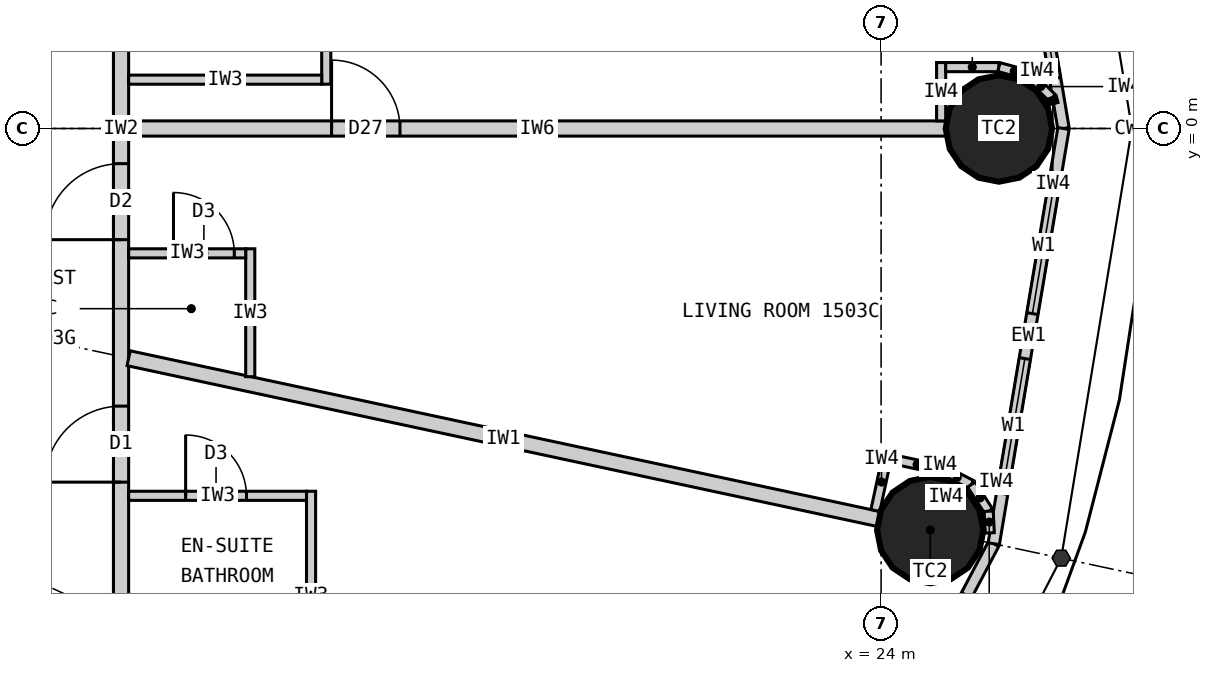
"""IFC4 building model, lengths in metres.
Left out: names, types, materials, properties, quantities, classifications, styles, units other than length and angle.
Written with IfcOpenShell. Run it as: python <this file> out.ifc"""

import sys

from ifc_helpers import new_model, si_unit, direction, frame, frame_2d, origin, origin_2d, place, context, subcontext, project, spatial, rectangle, circle, extrude, element, fill, save


model = new_model("IFC4")
c1 = context("Model", 3, precision=1e-05, world=origin(), true_north=direction((0.0, 1.0)))
c2 = subcontext(c1, "Body", "Model", "MODEL_VIEW")
j1 = project(units=[si_unit("LENGTHUNIT", "METRE"), si_unit("PLANEANGLEUNIT", "RADIAN")], contexts=[c1])
p1 = place(None, origin())
s1 = spatial("IfcSite", under=j1, at=p1, CompositionType="ELEMENT")
p2 = place(p1, origin())
s2 = spatial("IfcBuilding", under=s1, at=p2, CompositionType="ELEMENT")
p3 = place(p2, frame((0.0, 0.0, 63.9)))
s3 = spatial("IfcBuildingStorey", under=s2, at=p3, CompositionType="ELEMENT", Elevation=63.9)
for number, where, z_axis, x_axis in (
    (1, (25.55, 0.0, 0.0), (0.0, 0.0, 1.0), (1.0, 0.0, 0.0)),
    (2, (24.647, -5.283, 0.0), (0.0, 0.0, 1.0), (1.0, 0.0, 0.0)),
):
    element("IfcColumn", number, at=place(p3, frame(where, z_axis=z_axis, x_axis=x_axis)), inside=s3, PredefinedType="COLUMN", context=c2, shape_type="SweptSolid", body=[
        extrude(circle(Radius=0.7, at=origin_2d()), origin(), (0.0, 0.0, 1.0), 3.3),
    ])
p4 = place(p3, frame((26.4, 0.0, 0.0), z_axis=(0.0, 0.0, 1.0), x_axis=(-0.165642551694, 0.986185857264, 0.0)))
e3 = element("IfcWall", 3, at=p4, inside=s3, PredefinedType="ELEMENTEDWALL", context=c2, shape_type="SweptSolid", body=[
    extrude(rectangle(XDim=5.539, YDim=0.15, at=frame_2d((2.77, 0.0))), origin(), (0.0, 0.0, 1.0), 3.12),
])
p5 = place(p4, frame((0.669, 0.0, 0.9)))
e4 = element("IfcOpeningElement", 4, at=p5, cuts=e3, PredefinedType="OPENING", context=c2, shape_type="SweptSolid", body=[
    extrude(rectangle(XDim=1.8, YDim=1.9, at=frame_2d((0.9, 0.95))), frame((0.0, 0.085, 0.0), z_axis=(0.0, -1.0, 0.0), x_axis=(1.0, 0.0, 0.0)), (0.0, 0.0, 1.0), 0.17),
])
p6 = place(p4, frame((3.07, 0.0, 0.9)))
e5 = element("IfcOpeningElement", 5, at=p6, cuts=e3, PredefinedType="OPENING", context=c2, shape_type="SweptSolid", body=[
    extrude(rectangle(XDim=1.8, YDim=1.9, at=frame_2d((0.9, 0.95))), frame((0.0, 0.085, 0.0), z_axis=(0.0, -1.0, 0.0), x_axis=(1.0, 0.0, 0.0)), (0.0, 0.0, 1.0), 0.17),
])
p7 = place(p3, frame((22.803, -10.532, 0.0), z_axis=(0.0, 0.0, 1.0), x_axis=(0.467296867008, 0.884100468321, 0.0)))
e6 = element("IfcWall", 6, at=p7, inside=s3, PredefinedType="ELEMENTEDWALL", context=c2, shape_type="SweptSolid", body=[
    extrude(rectangle(XDim=5.734, YDim=0.15, at=frame_2d((2.867, 0.0))), origin(), (0.0, 0.0, 1.0), 3.12),
])
p8 = place(p7, frame((0.767, 0.0, 0.9)))
e7 = element("IfcOpeningElement", 7, at=p8, cuts=e6, PredefinedType="OPENING", context=c2, shape_type="SweptSolid", body=[
    extrude(rectangle(XDim=1.8, YDim=1.9, at=frame_2d((0.9, 0.95))), frame((0.0, 0.085, 0.0), z_axis=(0.0, -1.0, 0.0), x_axis=(1.0, 0.0, 0.0)), (0.0, 0.0, 1.0), 0.17),
])
p9 = place(p7, frame((3.167, 0.0, 0.9)))
e8 = element("IfcOpeningElement", 8, at=p9, cuts=e6, PredefinedType="OPENING", context=c2, shape_type="SweptSolid", body=[
    extrude(rectangle(XDim=1.8, YDim=1.9, at=frame_2d((0.9, 0.95))), frame((0.0, 0.085, 0.0), z_axis=(0.0, -1.0, 0.0), x_axis=(1.0, 0.0, 0.0)), (0.0, 0.0, 1.0), 0.17),
])
p10 = place(p3, frame((25.482, -5.462, 0.0), z_axis=(0.0, 0.0, 1.0), x_axis=(0.165642551694, 0.986185857264, 0.0)))
e9 = element("IfcWall", 9, at=p10, inside=s3, PredefinedType="ELEMENTEDWALL", context=c2, shape_type="SweptSolid", body=[
    extrude(rectangle(XDim=5.539, YDim=0.15, at=frame_2d((2.77, 0.0))), origin(), (0.0, 0.0, 1.0), 3.12),
])
p11 = place(p10, frame((0.669, 0.0, 0.9)))
e10 = element("IfcOpeningElement", 10, at=p11, cuts=e9, PredefinedType="OPENING", context=c2, shape_type="SweptSolid", body=[
    extrude(rectangle(XDim=1.8, YDim=1.9, at=frame_2d((0.9, 0.95))), frame((0.0, 0.085, 0.0), z_axis=(0.0, -1.0, 0.0), x_axis=(1.0, 0.0, 0.0)), (0.0, 0.0, 1.0), 0.17),
])
p12 = place(p10, frame((3.07, 0.0, 0.9)))
e11 = element("IfcOpeningElement", 11, at=p12, cuts=e9, PredefinedType="OPENING", context=c2, shape_type="SweptSolid", body=[
    extrude(rectangle(XDim=1.8, YDim=1.9, at=frame_2d((0.9, 0.95))), frame((0.0, 0.085, 0.0), z_axis=(0.0, -1.0, 0.0), x_axis=(1.0, 0.0, 0.0)), (0.0, 0.0, 1.0), 0.17),
])
p13 = place(p3, frame((14.0, -9.9, 0.0), z_axis=(0.0, 0.0, 1.0), x_axis=(0.0, 1.0, 0.0)))
e12 = element("IfcWall", 12, at=p13, inside=s3, PredefinedType="PARTITIONING", context=c2, shape_type="SweptSolid", body=[
    extrude(rectangle(XDim=19.8, YDim=0.2, at=frame_2d((9.9, 0.0))), origin(), (0.0, 0.0, 1.0), 3.12),
])
p14 = place(p13, frame((0.103, 0.0, 0.0)))
e13 = element("IfcOpeningElement", 13, at=p14, cuts=e12, PredefinedType="OPENING", context=c2, shape_type="SweptSolid", body=[
    extrude(rectangle(XDim=1.0, YDim=2.2, at=frame_2d((0.5, 1.1))), frame((0.0, 0.11, 0.0), z_axis=(0.0, -1.0, 0.0), x_axis=(1.0, 0.0, 0.0)), (0.0, 0.0, 1.0), 0.22),
])
p15 = place(p13, frame((5.248, 0.0, 0.0)))
e14 = element("IfcOpeningElement", 14, at=p15, cuts=e12, PredefinedType="OPENING", context=c2, shape_type="SweptSolid", body=[
    extrude(rectangle(XDim=1.0, YDim=2.2, at=frame_2d((0.5, 1.1))), frame((0.0, 0.11, 0.0), z_axis=(0.0, -1.0, 0.0), x_axis=(1.0, 0.0, 0.0)), (0.0, 0.0, 1.0), 0.22),
])
p16 = place(p13, frame((8.438, 0.0, 0.0)))
e15 = element("IfcOpeningElement", 15, at=p16, cuts=e12, PredefinedType="OPENING", context=c2, shape_type="SweptSolid", body=[
    extrude(rectangle(XDim=1.0, YDim=2.2, at=frame_2d((0.5, 1.1))), frame((0.0, 0.11, 0.0), z_axis=(0.0, -1.0, 0.0), x_axis=(1.0, 0.0, 0.0)), (0.0, 0.0, 1.0), 0.22),
])
p17 = place(p13, frame((14.532, 0.0, 0.0)))
e16 = element("IfcOpeningElement", 16, at=p17, cuts=e12, PredefinedType="OPENING", context=c2, shape_type="SweptSolid", body=[
    extrude(rectangle(XDim=1.0, YDim=2.2, at=frame_2d((0.5, 1.1))), frame((0.0, 0.11, 0.0), z_axis=(0.0, -1.0, 0.0), x_axis=(1.0, 0.0, 0.0)), (0.0, 0.0, 1.0), 0.22),
])
p18 = place(p3, frame((14.1, 0.0, 0.0), z_axis=(0.0, 0.0, 1.0), x_axis=(1.0, 0.0, 0.0)))
e17 = element("IfcWall", 17, at=p18, inside=s3, PredefinedType="PARTITIONING", context=c2, shape_type="SweptSolid", body=[
    extrude(rectangle(XDim=10.75, YDim=0.2, at=frame_2d((5.375, 0.0))), origin(), (0.0, 0.0, 1.0), 2.27),
])
p19 = place(p18, frame((2.67, 0.0, 0.0)))
e18 = element("IfcOpeningElement", 18, at=p19, cuts=e17, PredefinedType="OPENING", context=c2, shape_type="SweptSolid", body=[
    extrude(rectangle(XDim=0.9, YDim=2.1, at=frame_2d((0.45, 1.05))), frame((0.0, 0.11, 0.0), z_axis=(0.0, -1.0, 0.0), x_axis=(1.0, 0.0, 0.0)), (0.0, 0.0, 1.0), 0.22),
])
p20 = place(p3, frame((14.1, -3.022, 0.0), z_axis=(0.0, 0.0, 1.0), x_axis=(0.977790014929, -0.209586943072, 0.0)))
e19 = element("IfcWall", 19, at=p20, inside=s3, PredefinedType="PARTITIONING", context=c2, shape_type="SweptSolid", body=[
    extrude(rectangle(XDim=10.087, YDim=0.2, at=frame_2d((5.043, 0.0))), origin(), (0.0, 0.0, 1.0), 2.32),
])
p21 = place(p3, frame((16.5, -7.521, 0.0), z_axis=(0.0, 0.0, 1.0), x_axis=(0.0, 1.0, 0.0)))
e20 = element("IfcWall", 20, at=p21, inside=s3, PredefinedType="PARTITIONING", context=c2, shape_type="SweptSolid", body=[
    extrude(rectangle(XDim=2.749, YDim=0.12, at=frame_2d((1.374, 0.0))), origin(), (0.0, 0.0, 1.0), 3.12),
])
p22 = place(p3, frame((14.1, -4.833, 0.0), z_axis=(0.0, 0.0, 1.0), x_axis=(1.0, 0.0, 0.0)))
e21 = element("IfcWall", 21, at=p22, inside=s3, PredefinedType="PARTITIONING", context=c2, shape_type="SweptSolid", body=[
    extrude(rectangle(XDim=2.34, YDim=0.12, at=frame_2d((1.17, 0.0))), origin(), (0.0, 0.0, 1.0), 3.12),
])
p23 = place(p22, frame((0.75, 0.0, 0.0)))
e22 = element("IfcOpeningElement", 22, at=p23, cuts=e21, PredefinedType="OPENING", context=c2, shape_type="SweptSolid", body=[
    extrude(rectangle(XDim=0.8, YDim=2.1, at=frame_2d((0.4, 1.05))), frame((0.0, 0.07, 0.0), z_axis=(0.0, -1.0, 0.0), x_axis=(1.0, 0.0, 0.0)), (0.0, 0.0, 1.0), 0.14),
])
p24 = place(p3, frame((15.7, -3.265, 0.0), z_axis=(0.0, 0.0, 1.0), x_axis=(0.0, 1.0, 0.0)))
e23 = element("IfcWall", 23, at=p24, inside=s3, PredefinedType="PARTITIONING", context=c2, shape_type="SweptSolid", body=[
    extrude(rectangle(XDim=1.683, YDim=0.12, at=frame_2d((0.841, 0.0))), origin(), (0.0, 0.0, 1.0), 3.12),
])
p25 = place(p3, frame((14.1, -1.643, 0.0), z_axis=(0.0, 0.0, 1.0), x_axis=(1.0, 0.0, 0.0)))
e24 = element("IfcWall", 24, at=p25, inside=s3, PredefinedType="PARTITIONING", context=c2, shape_type="SweptSolid", body=[
    extrude(rectangle(XDim=1.54, YDim=0.12, at=frame_2d((0.77, 0.0))), origin(), (0.0, 0.0, 1.0), 2.32),
])
p26 = place(p25, frame((0.59, 0.0, 0.0)))
e25 = element("IfcOpeningElement", 25, at=p26, cuts=e24, PredefinedType="OPENING", context=c2, shape_type="SweptSolid", body=[
    extrude(rectangle(XDim=0.8, YDim=2.1, at=frame_2d((0.4, 1.05))), frame((0.0, 0.07, 0.0), z_axis=(0.0, -1.0, 0.0), x_axis=(1.0, 0.0, 0.0)), (0.0, 0.0, 1.0), 0.14),
])
p27 = place(p3, frame((16.7, 3.48, 0.0), z_axis=(0.0, 0.0, 1.0), x_axis=(0.0, -1.0, 0.0)))
e26 = element("IfcWall", 26, at=p27, inside=s3, PredefinedType="PARTITIONING", context=c2, shape_type="SweptSolid", body=[
    extrude(rectangle(XDim=2.897, YDim=0.12, at=frame_2d((1.449, 0.0))), origin(), (0.0, 0.0, 1.0), 3.12),
])
p28 = place(p27, frame((1.049, 0.0, 0.0)))
e27 = element("IfcOpeningElement", 27, at=p28, cuts=e26, PredefinedType="OPENING", context=c2, shape_type="SweptSolid", body=[
    extrude(rectangle(XDim=0.8, YDim=2.1, at=frame_2d((0.4, 1.05))), frame((0.0, 0.07, 0.0), z_axis=(0.0, -1.0, 0.0), x_axis=(1.0, 0.0, 0.0)), (0.0, 0.0, 1.0), 0.14),
])
p29 = place(p3, frame((14.1, 0.643, 0.0), z_axis=(0.0, 0.0, 1.0), x_axis=(1.0, 0.0, 0.0)))
e28 = element("IfcWall", 28, at=p29, inside=s3, PredefinedType="PARTITIONING", context=c2, shape_type="SweptSolid", body=[
    extrude(rectangle(XDim=2.54, YDim=0.12, at=frame_2d((1.27, 0.0))), origin(), (0.0, 0.0, 1.0), 3.12),
])
p30 = place(p3, frame((24.79, 0.1, 0.0), z_axis=(0.0, 0.0, 1.0), x_axis=(0.0, 1.0, 0.0)))
e29 = element("IfcWall", 29, at=p30, inside=s3, PredefinedType="PARTITIONING", context=c2, shape_type="SweptSolid", body=[
    extrude(rectangle(XDim=0.767, YDim=0.12, at=frame_2d((0.384, 0.0))), origin(), (0.0, 0.0, 1.0), 3.12),
])
p31 = place(p3, frame((24.85, 0.808, 0.0), z_axis=(0.0, 0.0, 1.0), x_axis=(1.0, 0.0, 0.0)))
e30 = element("IfcWall", 30, at=p31, inside=s3, PredefinedType="PARTITIONING", context=c2, shape_type="SweptSolid", body=[
    extrude(rectangle(XDim=0.7, YDim=0.12, at=frame_2d((0.35, 0.0))), origin(), (0.0, 0.0, 1.0), 3.12),
])
p32 = place(p3, frame((25.55, 0.808, 0.0), z_axis=(0.0, 0.0, 1.0), x_axis=(0.965807183573, -0.2592614205, 0.0)))
e31 = element("IfcWall", 31, at=p32, inside=s3, PredefinedType="PARTITIONING", context=c2, shape_type="SweptSolid", body=[
    extrude(rectangle(XDim=0.418, YDim=0.12, at=frame_2d((0.209, 0.0))), origin(), (0.0, 0.0, 1.0), 3.12),
])
p33 = place(p3, frame((25.954, 0.699, 0.0), z_axis=(0.0, 0.0, 1.0), x_axis=(0.707106781187, -0.707106781187, 0.0)))
e32 = element("IfcWall", 32, at=p33, inside=s3, PredefinedType="PARTITIONING", context=c2, shape_type="SweptSolid", body=[
    extrude(rectangle(XDim=0.418, YDim=0.12, at=frame_2d((0.209, 0.0))), origin(), (0.0, 0.0, 1.0), 3.12),
])
p34 = place(p3, frame((26.249, 0.404, 0.0), z_axis=(0.0, 0.0, 1.0), x_axis=(0.259754282609, -0.965674744759, 0.0)))
e33 = element("IfcWall", 33, at=p34, inside=s3, PredefinedType="PARTITIONING", context=c2, shape_type="SweptSolid", body=[
    extrude(rectangle(XDim=0.08, YDim=0.12, at=frame_2d((0.04, 0.0))), origin(), (0.0, 0.0, 1.0), 3.12),
])
p35 = place(p3, frame((23.925, -5.026, 0.0), z_axis=(0.0, 0.0, 1.0), x_axis=(0.209681192172, 0.977769808109, 0.0)))
e34 = element("IfcWall", 34, at=p35, inside=s3, PredefinedType="PARTITIONING", context=c2, shape_type="SweptSolid", body=[
    extrude(rectangle(XDim=0.767, YDim=0.12, at=frame_2d((0.384, 0.0))), origin(), (0.0, 0.0, 1.0), 3.12),
])
p36 = place(p3, frame((24.132, -4.347, 0.0), z_axis=(0.0, 0.0, 1.0), x_axis=(0.977776882509, -0.209648200638, 0.0)))
e35 = element("IfcWall", 35, at=p36, inside=s3, PredefinedType="PARTITIONING", context=c2, shape_type="SweptSolid", body=[
    extrude(rectangle(XDim=0.7, YDim=0.12, at=frame_2d((0.35, 0.0))), origin(), (0.0, 0.0, 1.0), 3.12),
])
for number, where, z_axis, x_axis in (
    (36, (24.816, -4.494, 0.0), (0.0, 0.0, 1.0), (0.89, -0.455, 0.0)),
    (37, (25.188, -4.684, 0.0), (0.0, 0.0, 1.0), (0.543, -0.84, 0.0)),
):
    element("IfcWall", number, at=place(p3, frame(where, z_axis=z_axis, x_axis=x_axis)), inside=s3, PredefinedType="PARTITIONING", context=c2, shape_type="SweptSolid", body=[
        extrude(rectangle(XDim=0.418, YDim=0.12, at=frame_2d((0.209, 0.0))), origin(), (0.0, 0.0, 1.0), 3.12),
    ])
p37 = place(p3, frame((25.416, -5.035, 0.0), z_axis=(0.0, 0.0, 1.0), x_axis=(0.050406329159, -0.998728793007, 0.0)))
e38 = element("IfcWall", 38, at=p37, inside=s3, PredefinedType="PARTITIONING", context=c2, shape_type="SweptSolid", body=[
    extrude(rectangle(XDim=0.286, YDim=0.12, at=frame_2d((0.143, 0.0))), origin(), (0.0, 0.0, 1.0), 3.12),
])
p38 = place(p5, origin())
e39 = element("IfcWindow", 39, at=p38, inside=s3, PartitioningType="SINGLE_PANEL", PredefinedType="WINDOW", context=c2, shape_type="SweptSolid", body=[
    extrude(rectangle(XDim=1.8, YDim=1.9, at=frame_2d((0.9, 0.95))), frame((0.0, 0.03, 0.0), z_axis=(0.0, -1.0, 0.0), x_axis=(1.0, 0.0, 0.0)), (0.0, 0.0, 1.0), 0.06),
])
fill(e4, e39)
p39 = place(p11, origin())
e40 = element("IfcWindow", 40, at=p39, inside=s3, PartitioningType="SINGLE_PANEL", PredefinedType="WINDOW", context=c2, shape_type="SweptSolid", body=[
    extrude(rectangle(XDim=1.8, YDim=1.9, at=frame_2d((0.9, 0.95))), frame((0.0, 0.03, 0.0), z_axis=(0.0, -1.0, 0.0), x_axis=(1.0, 0.0, 0.0)), (0.0, 0.0, 1.0), 0.06),
])
fill(e10, e40)
p40 = place(p12, origin())
e41 = element("IfcWindow", 41, at=p40, inside=s3, PartitioningType="SINGLE_PANEL", PredefinedType="WINDOW", context=c2, shape_type="SweptSolid", body=[
    extrude(rectangle(XDim=1.8, YDim=1.9, at=frame_2d((0.9, 0.95))), frame((0.0, 0.03, 0.0), z_axis=(0.0, -1.0, 0.0), x_axis=(1.0, 0.0, 0.0)), (0.0, 0.0, 1.0), 0.06),
])
fill(e11, e41)
p41 = place(p23, origin())
e42 = element("IfcDoor", 42, at=p41, inside=s3, OperationType="SINGLE_SWING_LEFT", PredefinedType="DOOR", context=c2, shape_type="SweptSolid", body=[
    extrude(rectangle(XDim=0.8, YDim=2.1, at=frame_2d((0.4, 1.05))), frame((0.0, 0.025, 0.0), z_axis=(0.0, -1.0, 0.0), x_axis=(1.0, 0.0, 0.0)), (0.0, 0.0, 1.0), 0.05),
])
fill(e22, e42)
p42 = place(p15, origin())
e43 = element("IfcDoor", 43, at=p42, inside=s3, OperationType="SINGLE_SWING_LEFT", PredefinedType="DOOR", context=c2, shape_type="SweptSolid", body=[
    extrude(rectangle(XDim=1.0, YDim=2.2, at=frame_2d((0.5, 1.1))), frame((0.0, 0.025, 0.0), z_axis=(0.0, -1.0, 0.0), x_axis=(1.0, 0.0, 0.0)), (0.0, 0.0, 1.0), 0.05),
])
fill(e14, e43)
p43 = place(p26, origin())
e44 = element("IfcDoor", 44, at=p43, inside=s3, OperationType="SINGLE_SWING_LEFT", PredefinedType="DOOR", context=c2, shape_type="SweptSolid", body=[
    extrude(rectangle(XDim=0.8, YDim=2.1, at=frame_2d((0.4, 1.05))), frame((0.0, 0.025, 0.0), z_axis=(0.0, -1.0, 0.0), x_axis=(1.0, 0.0, 0.0)), (0.0, 0.0, 1.0), 0.05),
])
fill(e25, e44)
p44 = place(p16, origin())
e45 = element("IfcDoor", 45, at=p44, inside=s3, OperationType="SINGLE_SWING_LEFT", PredefinedType="DOOR", context=c2, shape_type="SweptSolid", body=[
    extrude(rectangle(XDim=1.0, YDim=2.2, at=frame_2d((0.5, 1.1))), frame((0.0, 0.025, 0.0), z_axis=(0.0, -1.0, 0.0), x_axis=(1.0, 0.0, 0.0)), (0.0, 0.0, 1.0), 0.05),
])
fill(e15, e45)
p45 = place(p19, origin())
e46 = element("IfcDoor", 46, at=p45, inside=s3, OperationType="SINGLE_SWING_LEFT", PredefinedType="DOOR", context=c2, shape_type="SweptSolid", body=[
    extrude(rectangle(XDim=0.9, YDim=2.1, at=frame_2d((0.45, 1.05))), frame((0.0, 0.025, 0.0), z_axis=(0.0, -1.0, 0.0), x_axis=(1.0, 0.0, 0.0)), (0.0, 0.0, 1.0), 0.05),
])
fill(e18, e46)
save(model, sys.argv[1])
